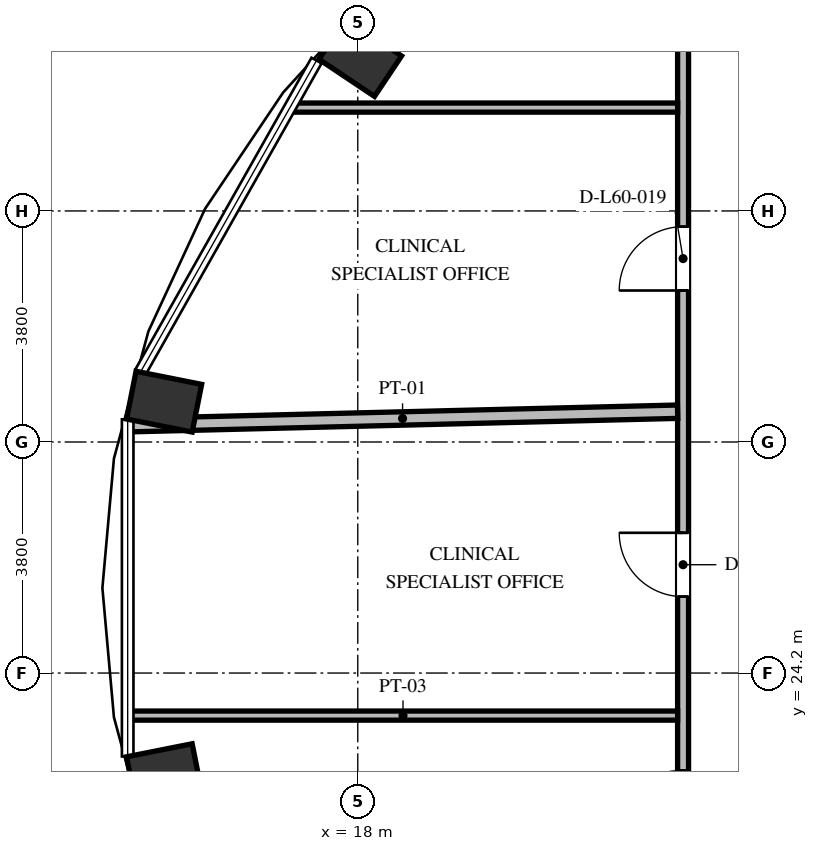
"""IFC4 building model, lengths in metres.
Left out: names, types, materials, properties, quantities, classifications, styles, units other than length and angle.
Written with IfcOpenShell. Run it as: python <this file> out.ifc"""

import sys

from ifc_helpers import new_model, si_unit, direction, frame, frame_2d, origin, origin_2d, place, context, subcontext, project, spatial, rectangle, extrude, element, fill, save


model = new_model("IFC4")
c1 = context("Model", 3, precision=1e-05, world=origin(), true_north=direction((0.0, 1.0)))
c2 = subcontext(c1, "Body", "Model", "MODEL_VIEW")
j1 = project(units=[si_unit("LENGTHUNIT", "METRE"), si_unit("PLANEANGLEUNIT", "RADIAN")], contexts=[c1])
p1 = place(None, origin())
s1 = spatial("IfcSite", under=j1, at=p1, CompositionType="ELEMENT")
p2 = place(p1, origin())
s2 = spatial("IfcBuilding", under=s1, at=p2, CompositionType="ELEMENT")
p3 = place(p2, frame((0.0, 0.0, 231.312)))
s3 = spatial("IfcBuildingStorey", under=s2, at=p3, CompositionType="ELEMENT", Elevation=231.312)
for number, where, z_axis, x_axis in (
    (1, (18.04, 34.323, 0.0), (0.0, 0.0, 1.0), (-0.831, 0.556, 0.0)),
    (2, (14.815, 28.663, 0.0), (0.0, 0.0, 1.0), (-0.981, 0.195, 0.0)),
    (3, (14.815, 22.537, 0.0), (0.0, 0.0, 1.0), (-0.981, -0.195, 0.0)),
):
    element("IfcColumn", number, at=place(p3, frame(where, z_axis=z_axis, x_axis=x_axis)), inside=s3, PredefinedType="COLUMN", context=c2, shape_type="SweptSolid", body=[
        extrude(rectangle(XDim=1.1, YDim=0.8, at=origin_2d()), origin(), (0.0, 0.0, 1.0), 3.648),
    ])
p4 = place(p3, frame((23.35, 19.98, 0.0), z_axis=(0.0, 0.0, 1.0), x_axis=(0.0, 1.0, 0.0)))
e4 = element("IfcWall", 4, at=p4, inside=s3, PredefinedType="PARTITIONING", context=c2, shape_type="SweptSolid", body=[
    extrude(rectangle(XDim=16.042, YDim=0.18, at=frame_2d((8.021, 0.0))), origin(), (0.0, 0.0, 1.0), 3.448),
])
p5 = place(p4, frame((5.477, 0.0, 0.0)))
e5 = element("IfcOpeningElement", 5, at=p5, cuts=e4, PredefinedType="OPENING", context=c2, shape_type="SweptSolid", body=[
    extrude(rectangle(XDim=1.05, YDim=2.15, at=frame_2d((0.525, 1.075))), frame((0.0, 0.1, 0.0), z_axis=(0.0, -1.0, 0.0), x_axis=(1.0, 0.0, 0.0)), (0.0, 0.0, 1.0), 0.2),
])
p6 = place(p4, frame((1.219, 0.0, 0.0)))
e6 = element("IfcOpeningElement", 6, at=p6, cuts=e4, PredefinedType="OPENING", context=c2, shape_type="SweptSolid", body=[
    extrude(rectangle(XDim=1.4, YDim=2.2, at=frame_2d((0.7, 1.1))), frame((0.0, 0.1, 0.0), z_axis=(0.0, -1.0, 0.0), x_axis=(1.0, 0.0, 0.0)), (0.0, 0.0, 1.0), 0.2),
])
p7 = place(p4, frame((10.511, 0.0, 0.0)))
e7 = element("IfcOpeningElement", 7, at=p7, cuts=e4, PredefinedType="OPENING", context=c2, shape_type="SweptSolid", body=[
    extrude(rectangle(XDim=1.05, YDim=2.15, at=frame_2d((0.525, 1.075))), frame((0.0, 0.1, 0.0), z_axis=(0.0, -1.0, 0.0), x_axis=(1.0, 0.0, 0.0)), (0.0, 0.0, 1.0), 0.2),
])
p8 = place(p3, frame((14.228, 23.5, 0.0), z_axis=(0.0, 0.0, 1.0), x_axis=(1.0, 0.0, 0.0)))
e8 = element("IfcWall", 8, at=p8, inside=s3, PredefinedType="PARTITIONING", context=c2, shape_type="SweptSolid", body=[
    extrude(rectangle(XDim=9.032, YDim=0.15, at=frame_2d((4.516, 0.0))), origin(), (0.0, 0.0, 1.0), 3.448),
])
p9 = place(p3, frame((14.213, 28.275, 0.0), z_axis=(0.0, 0.0, 1.0), x_axis=(0.99969661311, 0.024630910184, 0.0)))
e9 = element("IfcWall", 9, at=p9, inside=s3, PredefinedType="PARTITIONING", context=c2, shape_type="SweptSolid", body=[
    extrude(rectangle(XDim=9.05, YDim=0.22, at=frame_2d((4.525, 0.0))), origin(), (0.0, 0.0, 1.0), 3.448),
])
p10 = place(p3, frame((16.895, 33.5, 0.0), z_axis=(0.0, 0.0, 1.0), x_axis=(1.0, 0.0, 0.0)))
e10 = element("IfcWall", 10, at=p10, inside=s3, PredefinedType="PARTITIONING", context=c2, shape_type="SweptSolid", body=[
    extrude(rectangle(XDim=6.365, YDim=0.15, at=frame_2d((3.183, 0.0))), origin(), (0.0, 0.0, 1.0), 3.448),
])
p11 = place(p5, origin())
e11 = element("IfcDoor", 11, at=p11, inside=s3, OperationType="SINGLE_SWING_RIGHT", PredefinedType="DOOR", context=c2, shape_type="SweptSolid", body=[
    extrude(rectangle(XDim=1.05, YDim=2.15, at=frame_2d((0.525, 1.075))), frame((0.0, 0.025, 0.0), z_axis=(0.0, -1.0, 0.0), x_axis=(1.0, 0.0, 0.0)), (0.0, 0.0, 1.0), 0.05),
])
fill(e5, e11)
p12 = place(p6, origin())
e12 = element("IfcDoor", 12, at=p12, inside=s3, OperationType="SINGLE_SWING_LEFT", PredefinedType="DOOR", context=c2, shape_type="SweptSolid", body=[
    extrude(rectangle(XDim=1.4, YDim=2.2, at=frame_2d((0.7, 1.1))), frame((0.0, 0.025, 0.0), z_axis=(0.0, -1.0, 0.0), x_axis=(1.0, 0.0, 0.0)), (0.0, 0.0, 1.0), 0.05),
])
fill(e6, e12)
p13 = place(p7, origin())
e13 = element("IfcDoor", 13, at=p13, inside=s3, OperationType="SINGLE_SWING_LEFT", PredefinedType="DOOR", context=c2, shape_type="SweptSolid", body=[
    extrude(rectangle(XDim=1.05, YDim=2.15, at=frame_2d((0.525, 1.075))), frame((0.0, 0.025, 0.0), z_axis=(0.0, -1.0, 0.0), x_axis=(1.0, 0.0, 0.0)), (0.0, 0.0, 1.0), 0.05),
])
fill(e7, e13)
save(model, sys.argv[1])
